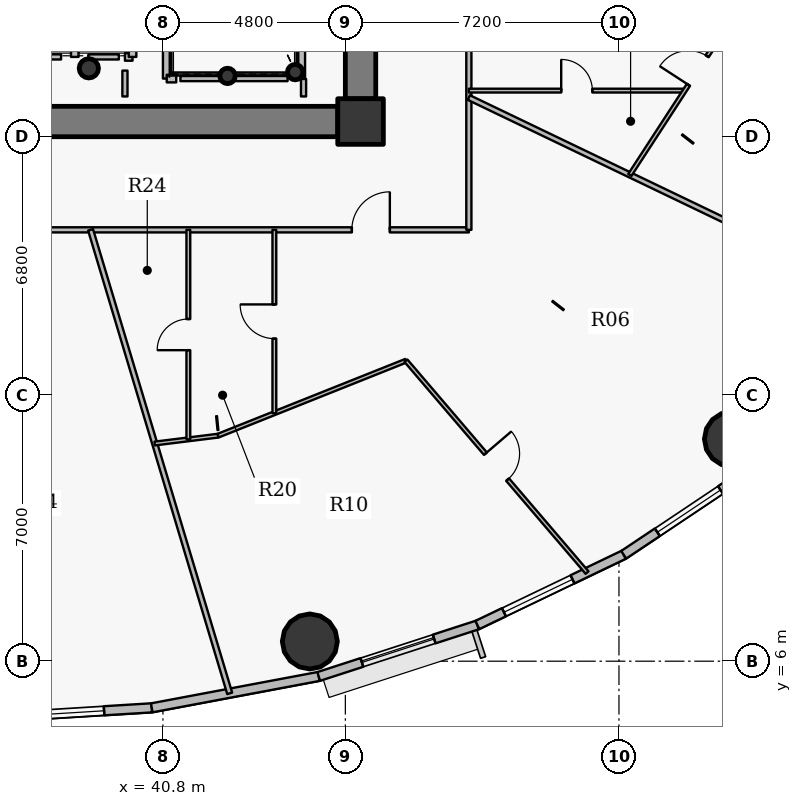
"""IFC4 building model, lengths in metres.
Left out: names, types, materials, properties, quantities, classifications, styles, units other than length and angle.
Written with IfcOpenShell. Run it as: python <this file> out.ifc"""

import sys

from ifc_helpers import new_model, si_unit, direction, frame, frame_2d, origin, origin_2d, place, context, subcontext, project, spatial, rectangle, hollow_circle, extrude, source, transform, mapped, element, fill, save


model = new_model("IFC4")
c1 = context("Model", 3, precision=1e-05, world=origin(), true_north=direction((0.0, 1.0)))
c2 = subcontext(c1, "Body", "Model", "MODEL_VIEW")
j1 = project(units=[si_unit("LENGTHUNIT", "METRE"), si_unit("PLANEANGLEUNIT", "RADIAN")], contexts=[c1])
p1 = place(None, origin())
s1 = spatial("IfcSite", under=j1, at=p1, CompositionType="ELEMENT")
p2 = place(p1, origin())
s2 = spatial("IfcBuilding", under=s1, at=p2, CompositionType="ELEMENT")
p3 = place(p2, frame((0.0, 0.0, 97.2)))
s3 = spatial("IfcBuildingStorey", under=s2, at=p3, CompositionType="ELEMENT", Elevation=97.2)
p4 = place(p3, frame((46.0, 20.2, 0.0), z_axis=(0.0, 0.0, 1.0), x_axis=(1.0, 0.0, 0.0)))
e1 = element("IfcColumn", 1, at=p4, inside=s3, PredefinedType="COLUMN", context=c2, shape_type="SweptSolid", body=[
    extrude(rectangle(XDim=1.2, YDim=1.2, at=origin_2d()), origin(), (0.0, 0.0, 1.0), 3.75),
])
p5 = place(p3, frame((38.85, 21.6, 0.0), z_axis=(0.0, 0.0, 1.0), x_axis=(1.0, 0.0, 0.0)))
e2 = element("IfcColumn", 2, at=p5, inside=s3, PredefinedType="COLUMN", context=c2, shape_type="SweptSolid", body=[
    extrude(hollow_circle(Radius=0.254, WallThickness=0.02, at=origin_2d()), origin(), (0.0, 0.0, 1.0), 3.75),
])
for number, where, z_axis, x_axis in (
    (3, (44.28, 21.5, 0.0), (0.0, 0.0, 1.0), (1.0, 0.0, 0.0)),
    (4, (42.5, 21.4, 0.0), (0.0, 0.0, 1.0), (1.0, 0.0, 0.0)),
):
    element("IfcColumn", number, at=place(p3, frame(where, z_axis=z_axis, x_axis=x_axis)), inside=s3, PredefinedType="COLUMN", context=c2, shape_type="SweptSolid", body=[
        extrude(hollow_circle(Radius=0.203, WallThickness=0.016, at=origin_2d()), origin(), (0.0, 0.0, 1.0), 3.75),
    ])
p6 = place(p3, frame((46.0, 33.2, 0.0), z_axis=(0.0, 0.0, 1.0), x_axis=(0.0, -1.0, 0.0)))
e5 = element("IfcWall", 5, at=p6, inside=s3, PredefinedType="SHEAR", context=c2, shape_type="SweptSolid", body=[
    extrude(rectangle(XDim=12.4, YDim=0.8, at=frame_2d((6.2, 0.0))), origin(), (0.0, 0.0, 1.0), 2.95),
])
p7 = place(p6, frame((5.79, 0.0, 0.0)))
e6 = element("IfcOpeningElement", 6, at=p7, cuts=e5, PredefinedType="OPENING", context=c2, shape_type="SweptSolid", body=[
    extrude(rectangle(XDim=0.82, YDim=2.1, at=origin_2d()), frame((0.41, 0.41, 1.05), z_axis=(0.0, -1.0, 0.0), x_axis=(1.0, 0.0, 0.0)), (0.0, 0.0, 1.0), 0.82),
])
p8 = place(p3, frame((45.4, 20.2, 0.0), z_axis=(0.0, 0.0, 1.0), x_axis=(-1.0, 0.0, 0.0)))
e7 = element("IfcWall", 7, at=p8, inside=s3, PredefinedType="SHEAR", context=c2, shape_type="SweptSolid", body=[
    extrude(rectangle(XDim=18.8, YDim=0.8, at=frame_2d((9.4, 0.0))), origin(), (0.0, 0.0, 1.0), 2.95),
])
p9 = place(p8, frame((10.15, 0.0, 0.0)))
e8 = element("IfcOpeningElement", 8, at=p9, cuts=e7, PredefinedType="OPENING", context=c2, shape_type="SweptSolid", body=[
    extrude(rectangle(XDim=1.15, YDim=2.15, at=origin_2d()), frame((0.575, 0.41, 1.075), z_axis=(0.0, -1.0, 0.0), x_axis=(1.0, 0.0, 0.0)), (0.0, 0.0, 1.0), 0.82),
])
for number, where, z_axis, x_axis in (
    (9, (44.666, 6.519, 0.0), (0.0, 0.0, 1.0), (1.0, 0.0, 0.0)),
    (10, (55.773, 11.844, 0.0), (0.0, 0.0, 1.0), (1.0, 0.0, 0.0)),
):
    element("IfcColumn", number, at=place(p3, frame(where, z_axis=z_axis, x_axis=x_axis)), inside=s3, PredefinedType="COLUMN", context=c2, shape_type="SweptSolid", body=[
        extrude(hollow_circle(Radius=0.725, WallThickness=0.042, at=origin_2d()), origin(), (0.0, 0.0, 1.0), 3.75),
    ])
p10 = place(p3, frame((40.506, 4.773, 0.0), z_axis=(0.0, 0.0, 1.0), x_axis=(-0.998107531589, -0.061492726276, 0.0)))
e11 = element("IfcWall", 11, at=p10, inside=s3, PredefinedType="SOLIDWALL", context=c2, shape_type="SweptSolid", body=[
    extrude(rectangle(XDim=4.514, YDim=0.24, at=frame_2d((2.257, 0.0))), origin(), (0.0, 0.0, 1.0), 3.5),
])
p11 = place(p10, frame((1.257, 0.0, 0.9)))
e12 = element("IfcOpeningElement", 12, at=p11, cuts=e11, PredefinedType="OPENING", context=c2, shape_type="SweptSolid", body=[
    extrude(rectangle(XDim=2.0, YDim=1.75, at=origin_2d()), frame((1.0, 0.13, 0.875), z_axis=(0.0, -1.0, 0.0), x_axis=(1.0, 0.0, 0.0)), (0.0, 0.0, 1.0), 0.26),
])
p12 = place(p3, frame((44.9, 5.599, 0.0), z_axis=(0.0, 0.0, 1.0), x_axis=(-0.982789252177, -0.184730305596, 0.0)))
e13 = element("IfcWall", 13, at=p12, inside=s3, PredefinedType="SOLIDWALL", context=c2, shape_type="SweptSolid", body=[
    extrude(rectangle(XDim=4.471, YDim=0.24, at=frame_2d((2.235, 0.0))), origin(), (0.0, 0.0, 1.0), 3.5),
])
p13 = place(p3, frame((49.074, 6.953, 0.0), z_axis=(0.0, 0.0, 1.0), x_axis=(-0.951211346073, -0.308540070495, 0.0)))
e14 = element("IfcWall", 14, at=p13, inside=s3, PredefinedType="SOLIDWALL", context=c2, shape_type="SweptSolid", body=[
    extrude(rectangle(XDim=4.388, YDim=0.24, at=frame_2d((2.194, 0.0))), origin(), (0.0, 0.0, 1.0), 3.5),
])
p14 = place(p13, frame((1.194, 0.0, 0.9)))
e15 = element("IfcOpeningElement", 15, at=p14, cuts=e14, PredefinedType="OPENING", context=c2, shape_type="SweptSolid", body=[
    extrude(rectangle(XDim=2.0, YDim=1.75, at=origin_2d()), frame((1.0, 0.13, 0.875), z_axis=(0.0, -1.0, 0.0), x_axis=(1.0, 0.0, 0.0)), (0.0, 0.0, 1.0), 0.26),
])
p15 = place(p3, frame((52.925, 8.801, 0.0), z_axis=(0.0, 0.0, 1.0), x_axis=(-0.901589935876, -0.432591709962, 0.0)))
e16 = element("IfcWall", 16, at=p15, inside=s3, PredefinedType="SOLIDWALL", context=c2, shape_type="SweptSolid", body=[
    extrude(rectangle(XDim=4.272, YDim=0.24, at=frame_2d((2.136, 0.0))), origin(), (0.0, 0.0, 1.0), 3.5),
])
p16 = place(p15, frame((1.495, 0.0, 0.9)))
e17 = element("IfcOpeningElement", 17, at=p16, cuts=e16, PredefinedType="OPENING", context=c2, shape_type="SweptSolid", body=[
    extrude(rectangle(XDim=2.0, YDim=1.75, at=origin_2d()), frame((1.0, 0.13, 0.875), z_axis=(0.0, -1.0, 0.0), x_axis=(1.0, 0.0, 0.0)), (0.0, 0.0, 1.0), 0.26),
])
p17 = place(p3, frame((56.358, 11.097, 0.0), z_axis=(0.0, 0.0, 1.0), x_axis=(-0.831221811447, -0.555940914284, 0.0)))
e18 = element("IfcWall", 18, at=p17, inside=s3, PredefinedType="SOLIDWALL", context=c2, shape_type="SweptSolid", body=[
    extrude(rectangle(XDim=4.13, YDim=0.24, at=frame_2d((2.065, 0.0))), origin(), (0.0, 0.0, 1.0), 3.5),
])
p18 = place(p17, frame((1.065, 0.0, 0.9)))
e19 = element("IfcOpeningElement", 19, at=p18, cuts=e18, PredefinedType="OPENING", context=c2, shape_type="SweptSolid", body=[
    extrude(rectangle(XDim=2.0, YDim=1.75, at=origin_2d()), frame((1.0, 0.13, 0.875), z_axis=(0.0, -1.0, 0.0), x_axis=(1.0, 0.0, 0.0)), (0.0, 0.0, 1.0), 0.26),
])
p19 = place(p3, frame((34.795, 17.35, 0.0), z_axis=(0.0, 0.0, 1.0), x_axis=(1.0, 0.0, 0.0)))
e20 = element("IfcWall", 20, at=p19, inside=s3, PredefinedType="PARTITIONING", context=c2, shape_type="SweptSolid", body=[
    extrude(rectangle(XDim=14.055, YDim=0.135, at=frame_2d((7.028, 0.0))), origin(), (0.0, 0.0, 1.0), 2.935),
])
p20 = place(p19, frame((1.571, 0.0, 0.0)))
e21 = element("IfcOpeningElement", 21, at=p20, cuts=e20, PredefinedType="OPENING", context=c2, shape_type="SweptSolid", body=[
    extrude(rectangle(XDim=1.0, YDim=2.15, at=origin_2d()), frame((0.5, 0.078, 1.075), z_axis=(0.0, -1.0, 0.0), x_axis=(1.0, 0.0, 0.0)), (0.0, 0.0, 1.0), 0.155),
])
p21 = place(p19, frame((10.976, 0.0, 0.0)))
e22 = element("IfcOpeningElement", 22, at=p21, cuts=e20, PredefinedType="OPENING", context=c2, shape_type="SweptSolid", body=[
    extrude(rectangle(XDim=1.0, YDim=2.15, at=origin_2d()), frame((0.5, 0.078, 1.075), z_axis=(0.0, -1.0, 0.0), x_axis=(1.0, 0.0, 0.0)), (0.0, 0.0, 1.0), 0.155),
])
p22 = place(p3, frame((38.48, 21.9, 0.0), z_axis=(0.0, 0.0, 1.0), x_axis=(0.0, 1.0, 0.0)))
e23 = element("IfcWall", 23, at=p22, inside=s3, PredefinedType="PARTITIONING", context=c2, shape_type="SweptSolid", body=[
    extrude(rectangle(XDim=1.8, YDim=0.2, at=frame_2d((0.9, 0.0))), origin(), (0.0, 0.0, 1.0), 3.5),
])
p23 = place(p3, frame((38.896, 17.35, 0.0), z_axis=(0.0, 0.0, 1.0), x_axis=(0.287463970392, -0.957791452105, 0.0)))
e24 = element("IfcWall", 24, at=p23, inside=s3, PredefinedType="PARTITIONING", context=c2, shape_type="SweptSolid", body=[
    extrude(rectangle(XDim=12.734, YDim=0.135, at=frame_2d((6.367, 0.0))), origin(), (0.0, 0.0, 1.0), 2.935),
])
p24 = place(p3, frame((39.8, 21.9, 0.0), z_axis=(0.0, 0.0, 1.0), x_axis=(1.0, 0.0, 0.0)))
e25 = element("IfcWall", 25, at=p24, inside=s3, PredefinedType="PARTITIONING", context=c2, shape_type="SweptSolid", body=[
    extrude(rectangle(XDim=0.2, YDim=0.2, at=frame_2d((0.1, 0.0))), origin(), (0.0, 0.0, 1.0), 3.5),
])
p25 = place(p3, frame((40.0, 21.9, 0.0), z_axis=(0.0, 0.0, 1.0), x_axis=(0.0, 1.0, 0.0)))
e26 = element("IfcWall", 26, at=p25, inside=s3, PredefinedType="PARTITIONING", context=c2, shape_type="SweptSolid", body=[
    extrude(rectangle(XDim=1.8, YDim=0.2, at=frame_2d((0.9, 0.0))), origin(), (0.0, 0.0, 1.0), 3.5),
])
p26 = place(p3, frame((40.584, 11.728, 0.0), z_axis=(0.0, 0.0, 1.0), x_axis=(0.992400317705, 0.123051247123, 0.0)))
e27 = element("IfcWall", 27, at=p26, inside=s3, PredefinedType="PARTITIONING", context=c2, shape_type="SweptSolid", body=[
    extrude(rectangle(XDim=1.68, YDim=0.1, at=frame_2d((0.84, 0.0))), origin(), (0.0, 0.0, 1.0), 2.935),
])
p27 = place(p3, frame((40.9, 21.33, 0.0), z_axis=(0.0, 0.0, 1.0), x_axis=(0.0, 1.0, 0.0)))
e28 = element("IfcWall", 28, at=p27, inside=s3, PredefinedType="PARTITIONING", context=c2, shape_type="SweptSolid", body=[
    extrude(rectangle(XDim=5.91, YDim=0.2, at=frame_2d((2.955, 0.0))), origin(), (0.0, 0.0, 1.0), 3.035),
])
p28 = place(p3, frame((40.9, 21.33, 0.0), z_axis=(0.0, 0.0, 1.0), x_axis=(1.0, 0.0, 0.0)))
e29 = element("IfcWall", 29, at=p28, inside=s3, PredefinedType="PARTITIONING", context=c2, shape_type="SweptSolid", body=[
    extrude(rectangle(XDim=0.25, YDim=0.2, at=frame_2d((0.125, 0.0))), origin(), (0.0, 0.0, 1.0), 3.035),
])
p29 = place(p3, frame((41.469, 11.837, 0.0), z_axis=(0.0, 0.0, 1.0), x_axis=(0.0, 1.0, 0.0)))
e30 = element("IfcWall", 30, at=p29, inside=s3, PredefinedType="PARTITIONING", context=c2, shape_type="SweptSolid", body=[
    extrude(rectangle(XDim=5.513, YDim=0.1, at=frame_2d((2.756, 0.0))), origin(), (0.0, 0.0, 1.0), 2.935),
])
p30 = place(p29, frame((2.346, 0.0, 0.0)))
e31 = element("IfcOpeningElement", 31, at=p30, cuts=e30, PredefinedType="OPENING", context=c2, shape_type="SweptSolid", body=[
    extrude(rectangle(XDim=0.82, YDim=2.1, at=origin_2d()), frame((0.41, 0.06, 1.05), z_axis=(0.0, -1.0, 0.0), x_axis=(1.0, 0.0, 0.0)), (0.0, 0.0, 1.0), 0.12),
])
p31 = place(p3, frame((42.251, 11.934, 0.0), z_axis=(0.0, 0.0, 1.0), x_axis=(0.928805351872, 0.370567967226, 0.0)))
e32 = element("IfcWall", 32, at=p31, inside=s3, PredefinedType="PARTITIONING", context=c2, shape_type="SweptSolid", body=[
    extrude(rectangle(XDim=5.322, YDim=0.1, at=frame_2d((2.661, 0.0))), origin(), (0.0, 0.0, 1.0), 2.935),
])
p32 = place(p3, frame((43.732, 12.525, 0.0), z_axis=(0.0, 0.0, 1.0), x_axis=(0.0, 1.0, 0.0)))
e33 = element("IfcWall", 33, at=p32, inside=s3, PredefinedType="PARTITIONING", context=c2, shape_type="SweptSolid", body=[
    extrude(rectangle(XDim=4.825, YDim=0.1, at=frame_2d((2.413, 0.0))), origin(), (0.0, 0.0, 1.0), 3.5),
])
p33 = place(p32, frame((1.962, 0.0, 0.0)))
e34 = element("IfcOpeningElement", 34, at=p33, cuts=e33, PredefinedType="OPENING", context=c2, shape_type="SweptSolid", body=[
    extrude(rectangle(XDim=0.9, YDim=2.1, at=origin_2d()), frame((0.45, 0.06, 1.05), z_axis=(0.0, -1.0, 0.0), x_axis=(1.0, 0.0, 0.0)), (0.0, 0.0, 1.0), 0.12),
])
p34 = place(p3, frame((44.44, 21.33, 0.0), z_axis=(0.0, 0.0, 1.0), x_axis=(0.0, 1.0, 0.0)))
e35 = element("IfcWall", 35, at=p34, inside=s3, PredefinedType="PARTITIONING", context=c2, shape_type="SweptSolid", body=[
    extrude(rectangle(XDim=8.52, YDim=0.2, at=frame_2d((4.26, 0.0))), origin(), (0.0, 0.0, 1.0), 3.5),
])
p35 = place(p3, frame((47.195, 13.906, 0.0), z_axis=(0.0, 0.0, 1.0), x_axis=(0.649828611722, -0.76008076899, 0.0)))
e36 = element("IfcWall", 36, at=p35, inside=s3, PredefinedType="PARTITIONING", context=c2, shape_type="SweptSolid", body=[
    extrude(rectangle(XDim=7.334, YDim=0.1, at=frame_2d((3.667, 0.0))), origin(), (0.0, 0.0, 1.0), 2.935),
])
p36 = place(p35, frame((3.217, 0.0, 0.0)))
e37 = element("IfcOpeningElement", 37, at=p36, cuts=e36, PredefinedType="OPENING", context=c2, shape_type="SweptSolid", body=[
    extrude(rectangle(XDim=0.9, YDim=2.1, at=origin_2d()), frame((0.45, 0.06, 1.05), z_axis=(0.0, -1.0, 0.0), x_axis=(1.0, 0.0, 0.0)), (0.0, 0.0, 1.0), 0.12),
])
p37 = place(p3, frame((48.85, 17.35, 0.0), z_axis=(0.0, 0.0, 1.0), x_axis=(0.0, 1.0, 0.0)))
e38 = element("IfcWall", 38, at=p37, inside=s3, PredefinedType="PARTITIONING", context=c2, shape_type="SweptSolid", body=[
    extrude(rectangle(XDim=19.3, YDim=0.135, at=frame_2d((9.65, 0.0))), origin(), (0.0, 0.0, 1.0), 2.935),
])
p38 = place(p37, frame((16.551, 0.0, 0.0)))
e39 = element("IfcOpeningElement", 39, at=p38, cuts=e38, PredefinedType="OPENING", context=c2, shape_type="SweptSolid", body=[
    extrude(rectangle(XDim=1.0, YDim=2.15, at=origin_2d()), frame((0.5, 0.078, 1.075), z_axis=(0.0, -1.0, 0.0), x_axis=(1.0, 0.0, 0.0)), (0.0, 0.0, 1.0), 0.155),
])
p39 = place(p37, frame((8.753, 0.0, 0.0)))
e40 = element("IfcOpeningElement", 40, at=p39, cuts=e38, PredefinedType="OPENING", context=c2, shape_type="SweptSolid", body=[
    extrude(rectangle(XDim=1.0, YDim=2.15, at=origin_2d()), frame((0.5, 0.078, 1.075), z_axis=(0.0, -1.0, 0.0), x_axis=(1.0, 0.0, 0.0)), (0.0, 0.0, 1.0), 0.155),
])
p40 = place(p3, frame((48.85, 20.83, 0.0), z_axis=(0.0, 0.0, 1.0), x_axis=(0.901472427533, -0.432836530803, 0.0)))
e41 = element("IfcWall", 41, at=p40, inside=s3, PredefinedType="PARTITIONING", context=c2, shape_type="SweptSolid", body=[
    extrude(rectangle(XDim=12.869, YDim=0.135, at=frame_2d((6.434, 0.0))), origin(), (0.0, 0.0, 1.0), 2.935),
])
p41 = place(p3, frame((48.85, 21.014, 0.0), z_axis=(0.0, 0.0, 1.0), x_axis=(1.0, 0.0, 0.0)))
e42 = element("IfcWall", 42, at=p41, inside=s3, PredefinedType="PARTITIONING", context=c2, shape_type="SweptSolid", body=[
    extrude(rectangle(XDim=5.68, YDim=0.1, at=frame_2d((2.84, 0.0))), origin(), (0.0, 0.0, 1.0), 2.935),
])
p42 = place(p41, frame((2.43, 0.0, 0.0)))
e43 = element("IfcOpeningElement", 43, at=p42, cuts=e42, PredefinedType="OPENING", context=c2, shape_type="SweptSolid", body=[
    extrude(rectangle(XDim=0.82, YDim=2.1, at=origin_2d()), frame((0.41, 0.06, 1.05), z_axis=(0.0, -1.0, 0.0), x_axis=(1.0, 0.0, 0.0)), (0.0, 0.0, 1.0), 0.12),
])
p43 = place(p3, frame((53.087, 18.796, 0.0), z_axis=(0.0, 0.0, 1.0), x_axis=(0.545403476424, 0.838173638278, 0.0)))
e44 = element("IfcWall", 44, at=p43, inside=s3, PredefinedType="PARTITIONING", context=c2, shape_type="SweptSolid", body=[
    extrude(rectangle(XDim=3.948, YDim=0.1, at=frame_2d((1.974, 0.0))), origin(), (0.0, 0.0, 1.0), 2.935),
])
p44 = place(p43, frame((2.827, 0.0, 0.0)))
e45 = element("IfcOpeningElement", 45, at=p44, cuts=e44, PredefinedType="OPENING", context=c2, shape_type="SweptSolid", body=[
    extrude(rectangle(XDim=0.9, YDim=2.1, at=origin_2d()), frame((0.45, 0.06, 1.05), z_axis=(0.0, -1.0, 0.0), x_axis=(1.0, 0.0, 0.0)), (0.0, 0.0, 1.0), 0.12),
])
p45 = place(p3, frame((55.431, 23.05, 0.0), z_axis=(0.0, 0.0, 1.0), x_axis=(0.979953651871, -0.199225601228, 0.0)))
e46 = element("IfcWall", 46, at=p45, inside=s3, PredefinedType="PARTITIONING", context=c2, shape_type="SweptSolid", body=[
    extrude(rectangle(XDim=8.513, YDim=0.1, at=frame_2d((4.257, 0.0))), origin(), (0.0, 0.0, 1.0), 2.935),
])
p46 = place(p3, frame((44.08, 21.33, 0.0), z_axis=(0.0, 0.0, 1.0), x_axis=(-1.0, 0.0, 0.0)))
e47 = element("IfcWall", 47, at=p46, inside=s3, PredefinedType="PARTITIONING", context=c2, shape_type="SweptSolid", body=[
    extrude(rectangle(XDim=2.82, YDim=0.135, at=frame_2d((1.41, 0.0))), origin(), (0.0, 0.0, 1.0), 3.035),
])
p47 = place(p3, frame((38.12, 21.9, 0.0), z_axis=(0.0, 0.0, 1.0), x_axis=(-1.0, 0.0, 0.0)))
e48 = element("IfcWall", 48, at=p47, inside=s3, PredefinedType="PARTITIONING", context=c2, shape_type="SweptSolid", body=[
    extrude(rectangle(XDim=0.8, YDim=0.135, at=frame_2d((0.4, 0.0))), origin(), (0.0, 0.0, 1.0), 3.5),
])
p48 = place(p3, frame((39.64, 21.9, 0.0), z_axis=(0.0, 0.0, 1.0), x_axis=(-1.0, 0.0, 0.0)))
e49 = element("IfcWall", 49, at=p48, inside=s3, PredefinedType="PARTITIONING", context=c2, shape_type="SweptSolid", body=[
    extrude(rectangle(XDim=0.8, YDim=0.135, at=frame_2d((0.4, 0.0))), origin(), (0.0, 0.0, 1.0), 3.085),
])
p49 = place(p3, frame((39.8, 20.86, 0.0), z_axis=(0.0, 0.0, 1.0), x_axis=(0.0, 1.0, 0.0)))
e50 = element("IfcWall", 50, at=p49, inside=s3, PredefinedType="PARTITIONING", context=c2, shape_type="SweptSolid", body=[
    extrude(rectangle(XDim=0.68, YDim=0.135, at=frame_2d((0.34, 0.0))), origin(), (0.0, 0.0, 1.0), 3.035),
])
p50 = place(p3, frame((44.5, 20.86, 0.0), z_axis=(0.0, 0.0, 1.0), x_axis=(0.0, 1.0, 0.0)))
e51 = element("IfcWall", 51, at=p50, inside=s3, PredefinedType="PARTITIONING", context=c2, shape_type="SweptSolid", body=[
    extrude(rectangle(XDim=0.46, YDim=0.135, at=frame_2d((0.23, 0.0))), origin(), (0.0, 0.0, 1.0), 3.5),
])
p51 = place(p3, frame((45.41, 19.8, 0.0), z_axis=(0.0, 0.0, 1.0), x_axis=(1.0, 0.0, 0.0)))
e52 = element("IfcWall", 52, at=p51, inside=s3, PredefinedType="PARTITIONING", context=c2, shape_type="SweptSolid", body=[
    extrude(rectangle(XDim=0.99, YDim=0.135, at=frame_2d((0.495, 0.0))), origin(), (0.0, 0.0, 1.0), 2.935),
])
p52 = place(p3, frame((46.4, 20.107, 0.0), z_axis=(0.0, 0.0, 1.0), x_axis=(0.0, 1.0, 0.0)))
e53 = element("IfcWall", 53, at=p52, inside=s3, PredefinedType="PARTITIONING", context=c2, shape_type="SweptSolid", body=[
    extrude(rectangle(XDim=0.683, YDim=0.135, at=frame_2d((0.341, 0.0))), origin(), (0.0, 0.0, 1.0), 3.5),
])
m1 = source(origin(), c2, "Body", "SweptSolid", [
    extrude(rectangle(XDim=2.0, YDim=1.75, at=origin_2d()), frame((1.0, 0.03, 0.875), z_axis=(0.0, -1.0, 0.0), x_axis=(1.0, 0.0, 0.0)), (0.0, 0.0, 1.0), 0.06),
])
p53 = place(p11, origin())
e54 = element("IfcWindow", 54, at=p53, inside=s3, PartitioningType="DOUBLE_PANEL_VERTICAL", PredefinedType="WINDOW", context=c2, shape_type="MappedRepresentation", body=[
    mapped(m1, transform((0.0, 0.0, 0.0), x_axis=(1.0, 0.0, 0.0), y_axis=(0.0, 1.0, 0.0), z_axis=(0.0, 0.0, 1.0), scale=1.0)),
])
fill(e12, e54)
p54 = place(p14, origin())
e55 = element("IfcWindow", 55, at=p54, inside=s3, PartitioningType="DOUBLE_PANEL_VERTICAL", PredefinedType="WINDOW", context=c2, shape_type="MappedRepresentation", body=[
    mapped(m1, transform((0.0, 0.0, 0.0), x_axis=(1.0, 0.0, 0.0), y_axis=(0.0, 1.0, 0.0), z_axis=(0.0, 0.0, 1.0), scale=1.0)),
])
fill(e15, e55)
p55 = place(p16, origin())
e56 = element("IfcWindow", 56, at=p55, inside=s3, PartitioningType="DOUBLE_PANEL_VERTICAL", PredefinedType="WINDOW", context=c2, shape_type="MappedRepresentation", body=[
    mapped(m1, transform((0.0, 0.0, 0.0), x_axis=(1.0, 0.0, 0.0), y_axis=(0.0, 1.0, 0.0), z_axis=(0.0, 0.0, 1.0), scale=1.0)),
])
fill(e17, e56)
p56 = place(p18, origin())
e57 = element("IfcWindow", 57, at=p56, inside=s3, PartitioningType="DOUBLE_PANEL_VERTICAL", PredefinedType="WINDOW", context=c2, shape_type="MappedRepresentation", body=[
    mapped(m1, transform((0.0, 0.0, 0.0), x_axis=(1.0, 0.0, 0.0), y_axis=(0.0, 1.0, 0.0), z_axis=(0.0, 0.0, 1.0), scale=1.0)),
])
fill(e19, e57)
m2 = source(origin(), c2, "Body", "SweptSolid", [
    extrude(rectangle(XDim=1.0, YDim=2.15, at=origin_2d()), frame((0.5, 0.025, 1.075), z_axis=(0.0, -1.0, 0.0), x_axis=(1.0, 0.0, 0.0)), (0.0, 0.0, 1.0), 0.05),
])
p57 = place(p21, origin())
e58 = element("IfcDoor", 58, at=p57, inside=s3, OperationType="SINGLE_SWING_RIGHT", PredefinedType="DOOR", context=c2, shape_type="MappedRepresentation", body=[
    mapped(m2, transform((0.0, 0.0, 0.0), x_axis=(1.0, 0.0, 0.0), y_axis=(0.0, 1.0, 0.0), z_axis=(0.0, 0.0, 1.0), scale=1.0)),
])
fill(e22, e58)
m3 = source(origin(), c2, "Body", "SweptSolid", [
    extrude(rectangle(XDim=0.9, YDim=2.1, at=origin_2d()), frame((0.45, 0.025, 1.05), z_axis=(0.0, -1.0, 0.0), x_axis=(1.0, 0.0, 0.0)), (0.0, 0.0, 1.0), 0.05),
])
p58 = place(p36, origin())
e59 = element("IfcDoor", 59, at=p58, inside=s3, OperationType="SINGLE_SWING_LEFT", PredefinedType="DOOR", context=c2, shape_type="MappedRepresentation", body=[
    mapped(m3, transform((0.0, 0.0, 0.0), x_axis=(1.0, 0.0, 0.0), y_axis=(0.0, 1.0, 0.0), z_axis=(0.0, 0.0, 1.0), scale=1.0)),
])
fill(e37, e59)
p59 = place(p33, origin())
e60 = element("IfcDoor", 60, at=p59, inside=s3, OperationType="SINGLE_SWING_RIGHT", PredefinedType="DOOR", context=c2, shape_type="MappedRepresentation", body=[
    mapped(m3, transform((0.0, 0.0, 0.0), x_axis=(1.0, 0.0, 0.0), y_axis=(0.0, 1.0, 0.0), z_axis=(0.0, 0.0, 1.0), scale=1.0)),
])
fill(e34, e60)
m4 = source(origin(), c2, "Body", "SweptSolid", [
    extrude(rectangle(XDim=0.82, YDim=2.1, at=origin_2d()), frame((0.41, 0.025, 1.05), z_axis=(0.0, -1.0, 0.0), x_axis=(1.0, 0.0, 0.0)), (0.0, 0.0, 1.0), 0.05),
])
p60 = place(p30, origin())
e61 = element("IfcDoor", 61, at=p60, inside=s3, OperationType="SINGLE_SWING_LEFT", PredefinedType="DOOR", context=c2, shape_type="MappedRepresentation", body=[
    mapped(m4, transform((0.0, 0.0, 0.0), x_axis=(1.0, 0.0, 0.0), y_axis=(0.0, 1.0, 0.0), z_axis=(0.0, 0.0, 1.0), scale=1.0)),
])
fill(e31, e61)
p61 = place(p44, origin())
e62 = element("IfcDoor", 62, at=p61, inside=s3, OperationType="SINGLE_SWING_LEFT", PredefinedType="DOOR", context=c2, shape_type="MappedRepresentation", body=[
    mapped(m3, transform((0.0, 0.0, 0.0), x_axis=(1.0, 0.0, 0.0), y_axis=(0.0, 1.0, 0.0), z_axis=(0.0, 0.0, 1.0), scale=1.0)),
])
fill(e45, e62)
p62 = place(p42, origin())
e63 = element("IfcDoor", 63, at=p62, inside=s3, OperationType="SINGLE_SWING_LEFT", PredefinedType="DOOR", context=c2, shape_type="MappedRepresentation", body=[
    mapped(m4, transform((0.0, 0.0, 0.0), x_axis=(1.0, 0.0, 0.0), y_axis=(0.0, 1.0, 0.0), z_axis=(0.0, 0.0, 1.0), scale=1.0)),
])
fill(e43, e63)
save(model, sys.argv[1])
